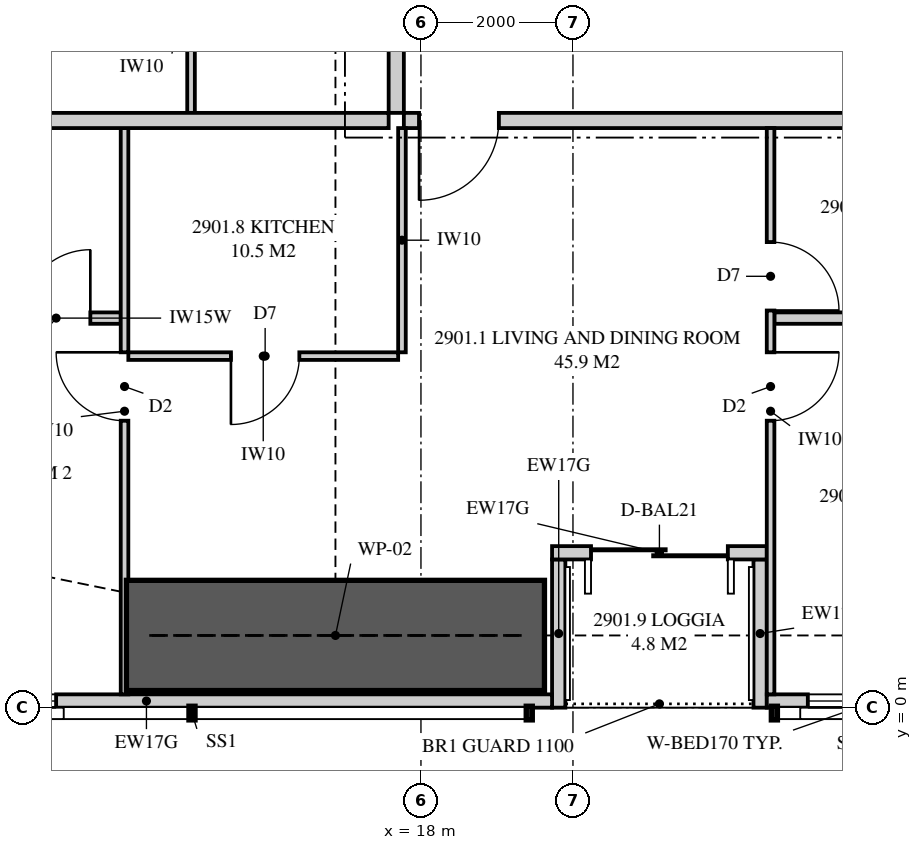
"""IFC4 building model, lengths in metres.
Left out: names, types, materials, properties, quantities, classifications, styles, units other than length and angle.
Written with IfcOpenShell. Run it as: python <this file> out.ifc"""

import sys

from ifc_helpers import new_model, si_unit, direction, frame, frame_2d, origin, place, context, subcontext, project, spatial, polyline, rectangle, outline, extrude, element, fill, save


model = new_model("IFC4")
c1 = context("Model", 3, precision=1e-05, world=origin(), true_north=direction((0.0, 1.0)))
c2 = subcontext(c1, "Body", "Model", "MODEL_VIEW")
j1 = project(units=[si_unit("LENGTHUNIT", "METRE"), si_unit("PLANEANGLEUNIT", "RADIAN")], contexts=[c1])
p1 = place(None, origin())
s1 = spatial("IfcSite", under=j1, at=p1, CompositionType="ELEMENT")
p2 = place(p1, origin())
s2 = spatial("IfcBuilding", under=s1, at=p2, CompositionType="ELEMENT")
p3 = place(p2, frame((0.0, 0.0, 108.2)))
s3 = spatial("IfcBuildingStorey", under=s2, at=p3, CompositionType="ELEMENT", Elevation=108.2)
p4 = place(p3, frame((9.051, 0.087, 0.0), z_axis=(0.0, 0.0, 1.0), x_axis=(1.0, 0.0, 0.0)))
e1 = element("IfcWall", 1, at=p4, inside=s3, PredefinedType="SOLIDWALL", context=c2, shape_type="SweptSolid", body=[
    extrude(outline(polyline([(0.0, 0.0), (10.674, 0.0), (10.674, 2.15), (7.824, 2.15), (7.824, 3.11), (7.666, 3.11), (7.666, 2.15), (7.62, 2.15), (7.62, 3.11), (0.0, 3.11), (0.0, 0.0)])), frame((0.0, 0.087, 0.0), z_axis=(0.0, -1.0, 0.0), x_axis=(1.0, 0.0, 0.0)), (0.0, 0.0, 1.0), 0.175),
])
p5 = place(p4, frame((2.349, 0.0, 0.4)))
e2 = element("IfcOpeningElement", 2, at=p5, cuts=e1, PredefinedType="OPENING", context=c2, shape_type="SweptSolid", body=[
    extrude(rectangle(XDim=1.8, YDim=1.7, at=frame_2d((0.9, 0.85))), frame((0.0, 0.097, 0.0), z_axis=(0.0, -1.0, 0.0), x_axis=(1.0, 0.0, 0.0)), (0.0, 0.0, 1.0), 0.195),
])
p6 = place(p3, frame((22.55, 0.087, 0.0), z_axis=(0.0, 0.0, 1.0), x_axis=(1.0, 0.0, 0.0)))
e3 = element("IfcWall", 3, at=p6, inside=s3, PredefinedType="SOLIDWALL", context=c2, shape_type="SweptSolid", body=[
    extrude(rectangle(XDim=8.3, YDim=0.175, at=frame_2d((4.15, 0.0))), origin(), (0.0, 0.0, 1.0), 2.15),
])
p7 = place(p6, frame((0.54, 0.0, 0.4)))
e4 = element("IfcOpeningElement", 4, at=p7, cuts=e3, PredefinedType="OPENING", context=c2, shape_type="SweptSolid", body=[
    extrude(rectangle(XDim=1.8, YDim=1.7, at=frame_2d((0.9, 0.85))), frame((0.0, 0.097, 0.0), z_axis=(0.0, -1.0, 0.0), x_axis=(1.0, 0.0, 0.0)), (0.0, 0.0, 1.0), 0.195),
])
p8 = place(p3, frame((19.725, 2.038, 0.0), z_axis=(0.0, 0.0, 1.0), x_axis=(1.0, 0.0, 0.0)))
e5 = element("IfcWall", 5, at=p8, inside=s3, PredefinedType="SOLIDWALL", context=c2, shape_type="SweptSolid", body=[
    extrude(rectangle(XDim=2.825, YDim=0.175, at=frame_2d((1.413, 0.0))), origin(), (0.0, 0.0, 1.0), 3.11),
])
p9 = place(p8, frame((0.512, 0.0, 0.0)))
e6 = element("IfcOpeningElement", 6, at=p9, cuts=e5, PredefinedType="OPENING", context=c2, shape_type="SweptSolid", body=[
    extrude(rectangle(XDim=1.8, YDim=2.1, at=frame_2d((0.9, 1.05))), frame((0.0, 0.097, 0.0), z_axis=(0.0, -1.0, 0.0), x_axis=(1.0, 0.0, 0.0)), (0.0, 0.0, 1.0), 0.195),
])
for number, where, z_axis, x_axis in (
    (7, (19.812, 0.0, 0.0), (0.0, 0.0, 1.0), (0.0, 1.0, 0.0)),
    (8, (22.462, 0.0, 0.0), (0.0, 0.0, 1.0), (0.0, 1.0, 0.0)),
):
    element("IfcWall", number, at=place(p3, frame(where, z_axis=z_axis, x_axis=x_axis)), inside=s3, PredefinedType="SOLIDWALL", context=c2, shape_type="SweptSolid", body=[
        extrude(outline(polyline([(0.0, 0.0), (1.95, 0.0), (1.95, 3.11), (1.75, 3.11), (1.75, 2.15), (0.15, 2.15), (0.15, 3.11), (0.0, 3.11), (0.0, 0.0)])), frame((0.0, 0.087, 0.0), z_axis=(0.0, -1.0, 0.0), x_axis=(1.0, 0.0, 0.0)), (0.0, 0.0, 1.0), 0.175),
    ])
p10 = place(p3, frame((17.775, 7.725, 0.0), z_axis=(0.0, 0.0, 1.0), x_axis=(1.0, 0.0, 0.0)))
e9 = element("IfcWall", 9, at=p10, inside=s3, PredefinedType="PARTITIONING", context=c2, shape_type="SweptSolid", body=[
    extrude(rectangle(XDim=8.225, YDim=0.2, at=frame_2d((4.113, 0.0))), origin(), (0.0, 0.0, 1.0), 3.11),
])
p11 = place(p10, frame((0.2, 0.0, 0.0)))
e10 = element("IfcOpeningElement", 10, at=p11, cuts=e9, PredefinedType="OPENING", context=c2, shape_type="SweptSolid", body=[
    extrude(rectangle(XDim=1.05, YDim=2.2, at=frame_2d((0.525, 1.1))), frame((0.0, 0.11, 0.0), z_axis=(0.0, -1.0, 0.0), x_axis=(1.0, 0.0, 0.0)), (0.0, 0.0, 1.0), 0.22),
])
p12 = place(p3, frame((14.1, 0.175, 0.0), z_axis=(0.0, 0.0, 1.0), x_axis=(0.0, 1.0, 0.0)))
e11 = element("IfcWall", 11, at=p12, inside=s3, PredefinedType="PARTITIONING", context=c2, shape_type="SweptSolid", body=[
    extrude(outline(polyline([(0.0, 0.0), (7.45, 0.0), (7.45, 3.11), (2.219, 3.11), (2.219, 2.15), (0.463, 2.15), (0.463, 3.11), (0.0, 3.11), (0.0, 0.0)])), frame((0.0, 0.05, 0.0), z_axis=(0.0, -1.0, 0.0), x_axis=(1.0, 0.0, 0.0)), (0.0, 0.0, 1.0), 0.1),
])
p13 = place(p12, frame((3.6, 0.0, 0.0)))
e12 = element("IfcOpeningElement", 12, at=p13, cuts=e11, PredefinedType="OPENING", context=c2, shape_type="SweptSolid", body=[
    extrude(rectangle(XDim=0.9, YDim=2.1, at=frame_2d((0.45, 1.05))), frame((0.0, 0.06, 0.0), z_axis=(0.0, -1.0, 0.0), x_axis=(1.0, 0.0, 0.0)), (0.0, 0.0, 1.0), 0.12),
])
p14 = place(p3, frame((22.6, 0.175, 0.0), z_axis=(0.0, 0.0, 1.0), x_axis=(0.0, 1.0, 0.0)))
e13 = element("IfcWall", 13, at=p14, inside=s3, PredefinedType="PARTITIONING", context=c2, shape_type="SweptSolid", body=[
    extrude(outline(polyline([(0.0, 0.0), (7.45, 0.0), (7.45, 3.11), (1.635, 3.11), (1.635, 2.15), (0.0, 2.15), (0.0, 3.11), (0.0, 0.0)])), frame((0.0, 0.05, 0.0), z_axis=(0.0, -1.0, 0.0), x_axis=(1.0, 0.0, 0.0)), (0.0, 0.0, 1.0), 0.1),
])
p15 = place(p14, frame((3.6, 0.0, 0.0)))
e14 = element("IfcOpeningElement", 14, at=p15, cuts=e13, PredefinedType="OPENING", context=c2, shape_type="SweptSolid", body=[
    extrude(rectangle(XDim=0.9, YDim=2.1, at=frame_2d((0.45, 1.05))), frame((0.0, 0.06, 0.0), z_axis=(0.0, -1.0, 0.0), x_axis=(1.0, 0.0, 0.0)), (0.0, 0.0, 1.0), 0.12),
])
p16 = place(p14, frame((5.05, 0.0, 0.0)))
e15 = element("IfcOpeningElement", 15, at=p16, cuts=e13, PredefinedType="OPENING", context=c2, shape_type="SweptSolid", body=[
    extrude(rectangle(XDim=0.9, YDim=2.1, at=frame_2d((0.45, 1.05))), frame((0.0, 0.06, 0.0), z_axis=(0.0, -1.0, 0.0), x_axis=(1.0, 0.0, 0.0)), (0.0, 0.0, 1.0), 0.12),
])
p17 = place(p3, frame((10.55, 5.125, 0.0), z_axis=(0.0, 0.0, 1.0), x_axis=(1.0, 0.0, 0.0)))
e16 = element("IfcWall", 16, at=p17, inside=s3, PredefinedType="PLUMBINGWALL", context=c2, shape_type="SweptSolid", body=[
    extrude(outline(polyline([(0.0, 0.0), (3.5, 0.0), (3.5, 3.11), (0.935, 3.11), (0.935, 2.51), (0.0, 2.51), (0.0, 3.11), (0.0, 0.0)])), frame((0.0, 0.075, 0.0), z_axis=(0.0, -1.0, 0.0), x_axis=(1.0, 0.0, 0.0)), (0.0, 0.0, 1.0), 0.15),
])
p18 = place(p17, frame((2.2, 0.0, 0.0)))
e17 = element("IfcOpeningElement", 17, at=p18, cuts=e16, PredefinedType="OPENING", context=c2, shape_type="SweptSolid", body=[
    extrude(rectangle(XDim=0.9, YDim=2.1, at=frame_2d((0.45, 1.05))), frame((0.0, 0.085, 0.0), z_axis=(0.0, -1.0, 0.0), x_axis=(1.0, 0.0, 0.0)), (0.0, 0.0, 1.0), 0.17),
])
p19 = place(p3, frame((22.65, 5.125, 0.0), z_axis=(0.0, 0.0, 1.0), x_axis=(1.0, 0.0, 0.0)))
e18 = element("IfcWall", 18, at=p19, inside=s3, PredefinedType="PLUMBINGWALL", context=c2, shape_type="SweptSolid", body=[
    extrude(rectangle(XDim=3.35, YDim=0.15, at=frame_2d((1.675, 0.0))), origin(), (0.0, 0.0, 1.0), 3.11),
])
p20 = place(p3, frame((14.15, 4.625, 0.0), z_axis=(0.0, 0.0, 1.0), x_axis=(1.0, 0.0, 0.0)))
e19 = element("IfcWall", 19, at=p20, inside=s3, PredefinedType="PARTITIONING", context=c2, shape_type="SweptSolid", body=[
    extrude(outline(polyline([(0.0, 0.0), (3.55, 0.0), (3.55, 3.11), (3.012, 3.11), (3.012, 2.541), (2.438, 2.541), (2.438, 3.11), (0.0, 3.11), (0.0, 0.0)])), frame((0.0, 0.05, 0.0), z_axis=(0.0, -1.0, 0.0), x_axis=(1.0, 0.0, 0.0)), (0.0, 0.0, 1.0), 0.1),
])
p21 = place(p20, frame((1.35, 0.0, 0.0)))
e20 = element("IfcOpeningElement", 20, at=p21, cuts=e19, PredefinedType="OPENING", context=c2, shape_type="SweptSolid", body=[
    extrude(rectangle(XDim=0.9, YDim=2.1, at=frame_2d((0.45, 1.05))), frame((0.0, 0.06, 0.0), z_axis=(0.0, -1.0, 0.0), x_axis=(1.0, 0.0, 0.0)), (0.0, 0.0, 1.0), 0.12),
])
p22 = place(p3, frame((17.75, 4.675, 0.0), z_axis=(0.0, 0.0, 1.0), x_axis=(0.0, 1.0, 0.0)))
e21 = element("IfcWall", 21, at=p22, inside=s3, PredefinedType="PARTITIONING", context=c2, shape_type="SweptSolid", body=[
    extrude(rectangle(XDim=2.95, YDim=0.1, at=frame_2d((1.475, 0.0))), origin(), (0.0, 0.0, 1.0), 3.11),
])
p23 = place(p3, frame((6.0, 7.725, 0.0), z_axis=(0.0, 0.0, 1.0), x_axis=(1.0, 0.0, 0.0)))
e22 = element("IfcWall", 22, at=p23, inside=s3, PredefinedType="PARTITIONING", context=c2, shape_type="SweptSolid", body=[
    extrude(outline(polyline([(0.0, 0.0), (11.575, 0.0), (11.575, 3.11), (11.212, 3.11), (11.212, 2.541), (10.538, 2.541), (10.538, 3.11), (5.51, 3.11), (5.51, 2.51), (2.969, 2.51), (2.969, 2.541), (2.727, 2.541), (2.727, 2.15), (0.884, 2.15), (0.884, 3.11), (0.0, 3.11), (0.0, 0.0)])), frame((0.0, 0.1, 0.0), z_axis=(0.0, -1.0, 0.0), x_axis=(1.0, 0.0, 0.0)), (0.0, 0.0, 1.0), 0.2),
])
p24 = place(p3, frame((17.675, 7.825, 0.0), z_axis=(0.0, 0.0, 1.0), x_axis=(0.0, 1.0, 0.0)))
e23 = element("IfcWall", 23, at=p24, inside=s3, PredefinedType="PARTITIONING", context=c2, shape_type="SweptSolid", body=[
    extrude(outline(polyline([(0.0, 0.0), (6.637, 0.0), (6.637, 3.11), (3.087, 3.11), (3.087, 2.541), (2.413, 2.541), (2.413, 3.11), (0.0, 3.11), (0.0, 0.0)])), frame((0.0, 0.1, 0.0), z_axis=(0.0, -1.0, 0.0), x_axis=(1.0, 0.0, 0.0)), (0.0, 0.0, 1.0), 0.2),
])
p25 = place(p3, frame((14.975, 7.825, 0.0), z_axis=(0.0, 0.0, 1.0), x_axis=(0.0, 1.0, 0.0)))
e24 = element("IfcWall", 24, at=p25, inside=s3, PredefinedType="PARTITIONING", context=c2, shape_type="SweptSolid", body=[
    extrude(outline(polyline([(0.0, 0.0), (3.45, 0.0), (3.45, 3.11), (3.037, 3.11), (3.037, 2.541), (2.463, 2.541), (2.463, 3.11), (0.0, 3.11), (0.0, 0.0)])), frame((0.0, 0.05, 0.0), z_axis=(0.0, -1.0, 0.0), x_axis=(1.0, 0.0, 0.0)), (0.0, 0.0, 1.0), 0.1),
])
p26 = place(p3, frame((14.125, 0.95, 0.0), z_axis=(0.0, 0.0, 1.0), x_axis=(1.0, 0.0, 0.0)))
e25 = element("IfcWall", 25, at=p26, inside=s3, PredefinedType="SHEAR", context=c2, shape_type="SweptSolid", body=[
    extrude(rectangle(XDim=5.5, YDim=1.45, at=frame_2d((2.75, 0.0))), origin(), (0.0, 0.0, 1.0), 3.35),
])
p27 = place(p5, origin())
e26 = element("IfcWindow", 26, at=p27, inside=s3, PartitioningType="SINGLE_PANEL", PredefinedType="WINDOW", context=c2, shape_type="SweptSolid", body=[
    extrude(rectangle(XDim=1.8, YDim=1.7, at=frame_2d((0.9, 0.85))), frame((0.0, 0.03, 0.0), z_axis=(0.0, -1.0, 0.0), x_axis=(1.0, 0.0, 0.0)), (0.0, 0.0, 1.0), 0.06),
])
fill(e2, e26)
p28 = place(p9, origin())
e27 = element("IfcDoor", 27, at=p28, inside=s3, OperationType="SLIDING_TO_LEFT", PredefinedType="DOOR", context=c2, shape_type="SweptSolid", body=[
    extrude(rectangle(XDim=1.8, YDim=2.1, at=frame_2d((0.9, 1.05))), frame((0.0, 0.025, 0.0), z_axis=(0.0, -1.0, 0.0), x_axis=(1.0, 0.0, 0.0)), (0.0, 0.0, 1.0), 0.05),
])
fill(e6, e27)
p29 = place(p7, origin())
e28 = element("IfcWindow", 28, at=p29, inside=s3, PartitioningType="SINGLE_PANEL", PredefinedType="WINDOW", context=c2, shape_type="SweptSolid", body=[
    extrude(rectangle(XDim=1.8, YDim=1.7, at=frame_2d((0.9, 0.85))), frame((0.0, 0.03, 0.0), z_axis=(0.0, -1.0, 0.0), x_axis=(1.0, 0.0, 0.0)), (0.0, 0.0, 1.0), 0.06),
])
fill(e4, e28)
p30 = place(p11, frame((1.05, 0.0, 0.0), z_axis=(0.0, 0.0, 1.0), x_axis=(-1.0, 0.0, 0.0)))
e29 = element("IfcDoor", 29, at=p30, inside=s3, OperationType="SINGLE_SWING_RIGHT", PredefinedType="DOOR", context=c2, shape_type="SweptSolid", body=[
    extrude(rectangle(XDim=1.05, YDim=2.2, at=frame_2d((0.525, 1.1))), frame((0.0, 0.025, 0.0), z_axis=(0.0, -1.0, 0.0), x_axis=(1.0, 0.0, 0.0)), (0.0, 0.0, 1.0), 0.05),
])
fill(e10, e29)
p31 = place(p13, origin())
e30 = element("IfcDoor", 30, at=p31, inside=s3, OperationType="SINGLE_SWING_RIGHT", PredefinedType="DOOR", context=c2, shape_type="SweptSolid", body=[
    extrude(rectangle(XDim=0.9, YDim=2.1, at=frame_2d((0.45, 1.05))), frame((0.0, 0.025, 0.0), z_axis=(0.0, -1.0, 0.0), x_axis=(1.0, 0.0, 0.0)), (0.0, 0.0, 1.0), 0.05),
])
fill(e12, e30)
p32 = place(p18, origin())
e31 = element("IfcDoor", 31, at=p32, inside=s3, OperationType="SINGLE_SWING_RIGHT", PredefinedType="DOOR", context=c2, shape_type="SweptSolid", body=[
    extrude(rectangle(XDim=0.9, YDim=2.1, at=frame_2d((0.45, 1.05))), frame((0.0, 0.025, 0.0), z_axis=(0.0, -1.0, 0.0), x_axis=(1.0, 0.0, 0.0)), (0.0, 0.0, 1.0), 0.05),
])
fill(e17, e31)
p33 = place(p15, frame((0.9, 0.0, 0.0), z_axis=(0.0, 0.0, 1.0), x_axis=(-1.0, 0.0, 0.0)))
e32 = element("IfcDoor", 32, at=p33, inside=s3, OperationType="SINGLE_SWING_LEFT", PredefinedType="DOOR", context=c2, shape_type="SweptSolid", body=[
    extrude(rectangle(XDim=0.9, YDim=2.1, at=frame_2d((0.45, 1.05))), frame((0.0, 0.025, 0.0), z_axis=(0.0, -1.0, 0.0), x_axis=(1.0, 0.0, 0.0)), (0.0, 0.0, 1.0), 0.05),
])
fill(e14, e32)
p34 = place(p16, frame((0.9, 0.0, 0.0), z_axis=(0.0, 0.0, 1.0), x_axis=(-1.0, 0.0, 0.0)))
e33 = element("IfcDoor", 33, at=p34, inside=s3, OperationType="SINGLE_SWING_RIGHT", PredefinedType="DOOR", context=c2, shape_type="SweptSolid", body=[
    extrude(rectangle(XDim=0.9, YDim=2.1, at=frame_2d((0.45, 1.05))), frame((0.0, 0.025, 0.0), z_axis=(0.0, -1.0, 0.0), x_axis=(1.0, 0.0, 0.0)), (0.0, 0.0, 1.0), 0.05),
])
fill(e15, e33)
p35 = place(p21, frame((0.9, 0.0, 0.0), z_axis=(0.0, 0.0, 1.0), x_axis=(-1.0, 0.0, 0.0)))
e34 = element("IfcDoor", 34, at=p35, inside=s3, OperationType="SINGLE_SWING_RIGHT", PredefinedType="DOOR", context=c2, shape_type="SweptSolid", body=[
    extrude(rectangle(XDim=0.9, YDim=2.1, at=frame_2d((0.45, 1.05))), frame((0.0, 0.025, 0.0), z_axis=(0.0, -1.0, 0.0), x_axis=(1.0, 0.0, 0.0)), (0.0, 0.0, 1.0), 0.05),
])
fill(e20, e34)
save(model, sys.argv[1])
